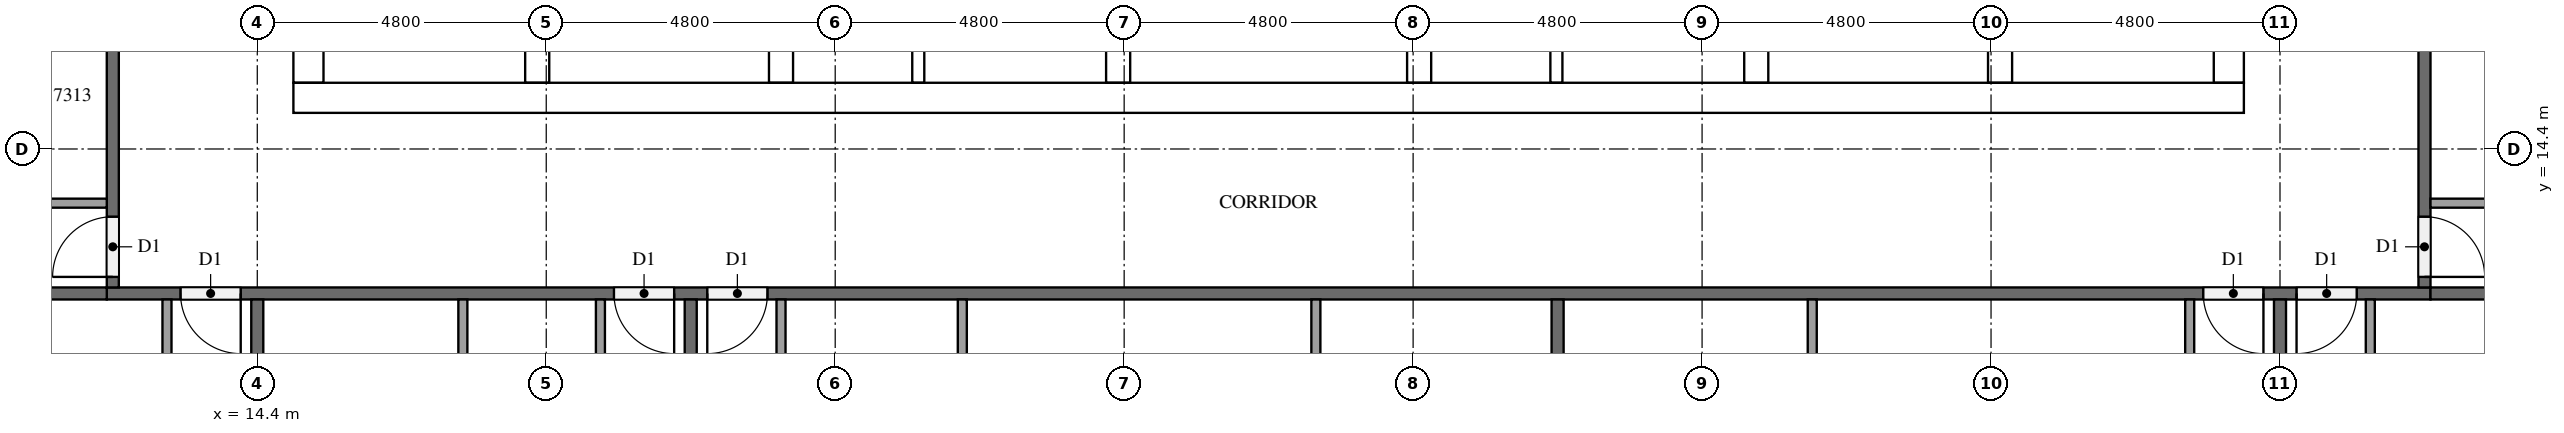
"""IFC4 building model, lengths in metres.
Left out: names, types, materials, properties, quantities, classifications, styles, units other than length and angle.
Written with IfcOpenShell. Run it as: python <this file> out.ifc"""

import sys

from ifc_helpers import new_model, si_unit, direction, frame, frame_2d, origin, place, context, subcontext, project, spatial, rectangle, extrude, element, fill, save


model = new_model("IFC4")
c1 = context("Model", 3, precision=1e-05, world=origin(), true_north=direction((0.0, 1.0)))
c2 = subcontext(c1, "Body", "Model", "MODEL_VIEW")
j1 = project(units=[si_unit("LENGTHUNIT", "METRE"), si_unit("PLANEANGLEUNIT", "RADIAN")], contexts=[c1])
p1 = place(None, origin())
s1 = spatial("IfcSite", under=j1, at=p1, CompositionType="ELEMENT")
p2 = place(p1, origin())
s2 = spatial("IfcBuilding", under=s1, at=p2, CompositionType="ELEMENT")
p3 = place(p2, frame((0.0, 0.0, 279.1)))
s3 = spatial("IfcBuildingStorey", under=s2, at=p3, CompositionType="ELEMENT", Elevation=279.1)
p4 = place(p3, frame((15.0, 15.25, 0.0), z_axis=(0.0, 0.0, 1.0), x_axis=(1.0, 0.0, 0.0)))
e1 = element("IfcWall", 1, at=p4, inside=s3, PredefinedType="SHEAR", context=c2, shape_type="SweptSolid", body=[
    extrude(rectangle(XDim=32.4, YDim=0.5, at=frame_2d((16.2, 0.0))), origin(), (0.0, 0.0, 1.0), 3.2),
])
p5 = place(p4, frame((15.3, 0.0, 0.0)))
e2 = element("IfcOpeningElement", 2, at=p5, cuts=e1, PredefinedType="OPENING", context=c2, shape_type="SweptSolid", body=[
    extrude(rectangle(XDim=1.8, YDim=2.1, at=frame_2d((0.9, 1.05))), frame((0.0, 0.26, 0.0), z_axis=(0.0, -1.0, 0.0), x_axis=(1.0, 0.0, 0.0)), (0.0, 0.0, 1.0), 0.52),
])
p6 = place(p3, frame((15.25, 15.5, 0.0), z_axis=(0.0, 0.0, 1.0), x_axis=(0.0, 1.0, 0.0)))
e3 = element("IfcWall", 3, at=p6, inside=s3, PredefinedType="SHEAR", context=c2, shape_type="SweptSolid", body=[
    extrude(rectangle(XDim=21.8, YDim=0.5, at=frame_2d((10.9, 0.0))), origin(), (0.0, 0.0, 1.0), 3.2),
])
p7 = place(p6, frame((5.26, 0.0, 0.0)))
e4 = element("IfcOpeningElement", 4, at=p7, cuts=e3, PredefinedType="OPENING", context=c2, shape_type="SweptSolid", body=[
    extrude(rectangle(XDim=1.2, YDim=2.1, at=frame_2d((0.6, 1.05))), frame((0.0, 0.26, 0.0), z_axis=(0.0, -1.0, 0.0), x_axis=(1.0, 0.0, 0.0)), (0.0, 0.0, 1.0), 0.52),
])
p8 = place(p3, frame((47.15, 15.5, 0.0), z_axis=(0.0, 0.0, 1.0), x_axis=(0.0, 1.0, 0.0)))
e5 = element("IfcWall", 5, at=p8, inside=s3, PredefinedType="SHEAR", context=c2, shape_type="SweptSolid", body=[
    extrude(rectangle(XDim=21.8, YDim=0.5, at=frame_2d((10.9, 0.0))), origin(), (0.0, 0.0, 1.0), 3.2),
])
p9 = place(p8, frame((10.6, 0.0, 0.0)))
e6 = element("IfcOpeningElement", 6, at=p9, cuts=e5, PredefinedType="OPENING", context=c2, shape_type="SweptSolid", body=[
    extrude(rectangle(XDim=1.2, YDim=2.1, at=frame_2d((0.6, 1.05))), frame((0.0, 0.26, 0.0), z_axis=(0.0, -1.0, 0.0), x_axis=(1.0, 0.0, 0.0)), (0.0, 0.0, 1.0), 0.52),
])
p10 = place(p3, frame((19.05, 15.5, 0.0), z_axis=(0.0, 0.0, 1.0), x_axis=(0.0, 1.0, 0.0)))
e7 = element("IfcWall", 7, at=p10, inside=s3, PredefinedType="SHEAR", context=c2, shape_type="SweptSolid", body=[
    extrude(rectangle(XDim=15.55, YDim=0.4, at=frame_2d((7.775, 0.0))), origin(), (0.0, 0.0, 1.0), 3.2),
])
p11 = place(p10, frame((9.95, 0.0, 0.0)))
e8 = element("IfcOpeningElement", 8, at=p11, cuts=e7, PredefinedType="OPENING", context=c2, shape_type="SweptSolid", body=[
    extrude(rectangle(XDim=1.1, YDim=2.1, at=frame_2d((0.55, 1.05))), frame((0.0, 0.21, 0.0), z_axis=(0.0, -1.0, 0.0), x_axis=(1.0, 0.0, 0.0)), (0.0, 0.0, 1.0), 0.42),
])
p12 = place(p10, frame((13.45, 0.0, 0.0)))
e9 = element("IfcOpeningElement", 9, at=p12, cuts=e7, PredefinedType="OPENING", context=c2, shape_type="SweptSolid", body=[
    extrude(rectangle(XDim=1.1, YDim=2.1, at=frame_2d((0.55, 1.05))), frame((0.0, 0.21, 0.0), z_axis=(0.0, -1.0, 0.0), x_axis=(1.0, 0.0, 0.0)), (0.0, 0.0, 1.0), 0.42),
])
p13 = place(p10, frame((0.7, 0.0, 0.0)))
e10 = element("IfcOpeningElement", 10, at=p13, cuts=e7, PredefinedType="OPENING", context=c2, shape_type="SweptSolid", body=[
    extrude(rectangle(XDim=1.2, YDim=2.1, at=frame_2d((0.6, 1.05))), frame((0.0, 0.21, 0.0), z_axis=(0.0, -1.0, 0.0), x_axis=(1.0, 0.0, 0.0)), (0.0, 0.0, 1.0), 0.42),
])
p14 = place(p3, frame((23.1, 15.5, 0.0), z_axis=(0.0, 0.0, 1.0), x_axis=(0.0, 1.0, 0.0)))
e11 = element("IfcWall", 11, at=p14, inside=s3, PredefinedType="SHEAR", context=c2, shape_type="SweptSolid", body=[
    extrude(rectangle(XDim=21.8, YDim=0.4, at=frame_2d((10.9, 0.0))), origin(), (0.0, 0.0, 1.0), 3.2),
])
p15 = place(p3, frame((39.3, 15.5, 0.0), z_axis=(0.0, 0.0, 1.0), x_axis=(0.0, 1.0, 0.0)))
e12 = element("IfcWall", 12, at=p15, inside=s3, PredefinedType="SHEAR", context=c2, shape_type="SweptSolid", body=[
    extrude(rectangle(XDim=8.75, YDim=0.4, at=frame_2d((4.375, 0.0))), origin(), (0.0, 0.0, 1.0), 3.2),
])
p16 = place(p3, frame((43.35, 15.5, 0.0), z_axis=(0.0, 0.0, 1.0), x_axis=(0.0, 1.0, 0.0)))
e13 = element("IfcWall", 13, at=p16, inside=s3, PredefinedType="SHEAR", context=c2, shape_type="SweptSolid", body=[
    extrude(rectangle(XDim=8.75, YDim=0.4, at=frame_2d((4.375, 0.0))), origin(), (0.0, 0.0, 1.0), 3.2),
])
p17 = place(p16, frame((0.7, 0.0, 0.0)))
e14 = element("IfcOpeningElement", 14, at=p17, cuts=e13, PredefinedType="OPENING", context=c2, shape_type="SweptSolid", body=[
    extrude(rectangle(XDim=1.2, YDim=2.1, at=frame_2d((0.6, 1.05))), frame((0.0, 0.21, 0.0), z_axis=(0.0, -1.0, 0.0), x_axis=(1.0, 0.0, 0.0)), (0.0, 0.0, 1.0), 0.42),
])
for number, where, z_axis, x_axis in (
    (15, (28.7, 15.5, 0.0), (0.0, 0.0, 1.0), (0.0, 1.0, 0.0)),
    (16, (33.7, 15.5, 0.0), (0.0, 0.0, 1.0), (0.0, 1.0, 0.0)),
):
    element("IfcWall", number, at=place(p3, frame(where, z_axis=z_axis, x_axis=x_axis)), inside=s3, PredefinedType="SHEAR", context=c2, shape_type="SweptSolid", body=[
        extrude(rectangle(XDim=3.05, YDim=0.4, at=frame_2d((1.525, 0.0))), origin(), (0.0, 0.0, 1.0), 3.2),
    ])
for number, where, z_axis, x_axis in (
    (17, (25.38, 15.5, 0.0), (0.0, 0.0, 1.0), (0.0, 1.0, 0.0)),
    (18, (35.98, 15.5, 0.0), (0.0, 0.0, 1.0), (0.0, 1.0, 0.0)),
):
    element("IfcWall", number, at=place(p3, frame(where, z_axis=z_axis, x_axis=x_axis)), inside=s3, PredefinedType="PARTITIONING", context=c2, shape_type="SweptSolid", body=[
        extrude(rectangle(XDim=3.05, YDim=0.2, at=frame_2d((1.525, 0.0))), origin(), (0.0, 0.0, 1.0), 3.2),
    ])
p18 = place(p3, frame((50.5, 12.0, 0.0), z_axis=(0.0, 0.0, 1.0), x_axis=(-1.0, 0.0, 0.0)))
e19 = element("IfcWall", 19, at=p18, inside=s3, PredefinedType="PARTITIONING", context=c2, shape_type="SweptSolid", body=[
    extrude(rectangle(XDim=38.6, YDim=0.2, at=frame_2d((19.3, 0.0))), origin(), (0.0, 0.0, 1.0), 3.2),
])
p19 = place(p18, frame((36.375, 0.0, 0.0)))
e20 = element("IfcOpeningElement", 20, at=p19, cuts=e19, PredefinedType="OPENING", context=c2, shape_type="SweptSolid", body=[
    extrude(rectangle(XDim=1.0, YDim=2.1, at=frame_2d((0.5, 1.05))), frame((0.0, 0.11, 0.0), z_axis=(0.0, -1.0, 0.0), x_axis=(1.0, 0.0, 0.0)), (0.0, 0.0, 1.0), 0.22),
])
p20 = place(p18, frame((29.175, 0.0, 0.0)))
e21 = element("IfcOpeningElement", 21, at=p20, cuts=e19, PredefinedType="OPENING", context=c2, shape_type="SweptSolid", body=[
    extrude(rectangle(XDim=1.0, YDim=2.1, at=frame_2d((0.5, 1.05))), frame((0.0, 0.11, 0.0), z_axis=(0.0, -1.0, 0.0), x_axis=(1.0, 0.0, 0.0)), (0.0, 0.0, 1.0), 0.22),
])
p21 = place(p18, frame((27.625, 0.0, 0.0)))
e22 = element("IfcOpeningElement", 22, at=p21, cuts=e19, PredefinedType="OPENING", context=c2, shape_type="SweptSolid", body=[
    extrude(rectangle(XDim=1.0, YDim=2.1, at=frame_2d((0.5, 1.05))), frame((0.0, 0.11, 0.0), z_axis=(0.0, -1.0, 0.0), x_axis=(1.0, 0.0, 0.0)), (0.0, 0.0, 1.0), 0.22),
])
p22 = place(p18, frame((2.775, 0.0, 0.0)))
e23 = element("IfcOpeningElement", 23, at=p22, cuts=e19, PredefinedType="OPENING", context=c2, shape_type="SweptSolid", body=[
    extrude(rectangle(XDim=1.0, YDim=2.1, at=frame_2d((0.5, 1.05))), frame((0.0, 0.11, 0.0), z_axis=(0.0, -1.0, 0.0), x_axis=(1.0, 0.0, 0.0)), (0.0, 0.0, 1.0), 0.22),
])
p23 = place(p18, frame((1.225, 0.0, 0.0)))
e24 = element("IfcOpeningElement", 24, at=p23, cuts=e19, PredefinedType="OPENING", context=c2, shape_type="SweptSolid", body=[
    extrude(rectangle(XDim=1.0, YDim=2.1, at=frame_2d((0.5, 1.05))), frame((0.0, 0.11, 0.0), z_axis=(0.0, -1.0, 0.0), x_axis=(1.0, 0.0, 0.0)), (0.0, 0.0, 1.0), 0.22),
])
p24 = place(p3, frame((50.4, 40.7, 0.0), z_axis=(0.0, 0.0, 1.0), x_axis=(0.0, -1.0, 0.0)))
e25 = element("IfcWall", 25, at=p24, inside=s3, PredefinedType="PARTITIONING", context=c2, shape_type="SweptSolid", body=[
    extrude(rectangle(XDim=28.6, YDim=0.2, at=frame_2d((14.3, 0.0))), origin(), (0.0, 0.0, 1.0), 3.2),
])
p25 = place(p24, frame((27.425, 0.0, 0.0)))
e26 = element("IfcOpeningElement", 26, at=p25, cuts=e25, PredefinedType="OPENING", context=c2, shape_type="SweptSolid", body=[
    extrude(rectangle(XDim=1.0, YDim=2.1, at=frame_2d((0.5, 1.05))), frame((0.0, 0.11, 0.0), z_axis=(0.0, -1.0, 0.0), x_axis=(1.0, 0.0, 0.0)), (0.0, 0.0, 1.0), 0.22),
])
p26 = place(p24, frame((13.025, 0.0, 0.0)))
e27 = element("IfcOpeningElement", 27, at=p26, cuts=e25, PredefinedType="OPENING", context=c2, shape_type="SweptSolid", body=[
    extrude(rectangle(XDim=1.0, YDim=2.1, at=frame_2d((0.5, 1.05))), frame((0.0, 0.11, 0.0), z_axis=(0.0, -1.0, 0.0), x_axis=(1.0, 0.0, 0.0)), (0.0, 0.0, 1.0), 0.22),
])
p27 = place(p3, frame((12.0, 12.1, 0.0), z_axis=(0.0, 0.0, 1.0), x_axis=(0.0, 1.0, 0.0)))
e28 = element("IfcWall", 28, at=p27, inside=s3, PredefinedType="PARTITIONING", context=c2, shape_type="SweptSolid", body=[
    extrude(rectangle(XDim=28.6, YDim=0.2, at=frame_2d((14.3, 0.0))), origin(), (0.0, 0.0, 1.0), 3.2),
])
p28 = place(p27, frame((16.975, 0.0, 0.0)))
e29 = element("IfcOpeningElement", 29, at=p28, cuts=e28, PredefinedType="OPENING", context=c2, shape_type="SweptSolid", body=[
    extrude(rectangle(XDim=1.0, YDim=2.1, at=frame_2d((0.5, 1.05))), frame((0.0, 0.11, 0.0), z_axis=(0.0, -1.0, 0.0), x_axis=(1.0, 0.0, 0.0)), (0.0, 0.0, 1.0), 0.22),
])
p29 = place(p27, frame((0.175, 0.0, 0.0)))
e30 = element("IfcOpeningElement", 30, at=p29, cuts=e28, PredefinedType="OPENING", context=c2, shape_type="SweptSolid", body=[
    extrude(rectangle(XDim=1.0, YDim=2.1, at=frame_2d((0.5, 1.05))), frame((0.0, 0.11, 0.0), z_axis=(0.0, -1.0, 0.0), x_axis=(1.0, 0.0, 0.0)), (0.0, 0.0, 1.0), 0.22),
])
p30 = place(p3, frame((14.4, 11.9, 0.0), z_axis=(0.0, 0.0, 1.0), x_axis=(0.0, -1.0, 0.0)))
e31 = element("IfcWall", 31, at=p30, inside=s3, PredefinedType="PARTITIONING", context=c2, shape_type="SweptSolid", body=[
    extrude(rectangle(XDim=11.65, YDim=0.2, at=frame_2d((5.825, 0.0))), origin(), (0.0, 0.0, 1.0), 3.2),
])
for number, where, z_axis, x_axis in (
    (32, (0.1, 12.0, 0.0), (0.0, 0.0, 1.0), (1.0, 0.0, 0.0)),
    (33, (21.6, 11.9, 0.0), (0.0, 0.0, 1.0), (0.0, -1.0, 0.0)),
    (34, (36.0, 11.9, 0.0), (0.0, 0.0, 1.0), (0.0, -1.0, 0.0)),
    (35, (48.0, 11.9, 0.0), (0.0, 0.0, 1.0), (0.0, -1.0, 0.0)),
):
    element("IfcWall", number, at=place(p3, frame(where, z_axis=z_axis, x_axis=x_axis)), inside=s3, PredefinedType="PARTITIONING", context=c2, shape_type="SweptSolid", body=[
        extrude(rectangle(XDim=11.8, YDim=0.2, at=frame_2d((5.9, 0.0))), origin(), (0.0, 0.0, 1.0), 3.2),
    ])
p31 = place(p3, frame((50.5, 12.0, 0.0), z_axis=(0.0, 0.0, 1.0), x_axis=(1.0, 0.0, 0.0)))
e36 = element("IfcWall", 36, at=p31, inside=s3, PredefinedType="PARTITIONING", context=c2, shape_type="SweptSolid", body=[
    extrude(rectangle(XDim=7.0, YDim=0.2, at=frame_2d((3.5, 0.0))), origin(), (0.0, 0.0, 1.0), 3.2),
])
p32 = place(p3, frame((12.9, 11.9, 0.0), z_axis=(0.0, 0.0, 1.0), x_axis=(0.0, -1.0, 0.0)))
e37 = element("IfcWall", 37, at=p32, inside=s3, PredefinedType="PARTITIONING", context=c2, shape_type="SweptSolid", body=[
    extrude(rectangle(XDim=3.125, YDim=0.15, at=frame_2d((1.562, 0.0))), origin(), (0.0, 0.0, 1.0), 3.2),
])
p33 = place(p3, frame((17.815, 11.9, 0.0), z_axis=(0.0, 0.0, 1.0), x_axis=(0.0, -1.0, 0.0)))
e38 = element("IfcWall", 38, at=p33, inside=s3, PredefinedType="PARTITIONING", context=c2, shape_type="SweptSolid", body=[
    extrude(rectangle(XDim=2.975, YDim=0.15, at=frame_2d((1.487, 0.0))), origin(), (0.0, 0.0, 1.0), 3.2),
])
p34 = place(p3, frame((20.1, 11.9, 0.0), z_axis=(0.0, 0.0, 1.0), x_axis=(0.0, -1.0, 0.0)))
e39 = element("IfcWall", 39, at=p34, inside=s3, PredefinedType="PARTITIONING", context=c2, shape_type="SweptSolid", body=[
    extrude(rectangle(XDim=3.125, YDim=0.15, at=frame_2d((1.562, 0.0))), origin(), (0.0, 0.0, 1.0), 3.2),
])
for number, where, z_axis, x_axis in (
    (40, (26.112, 11.9, 0.0), (0.0, 0.0, 1.0), (0.0, -1.0, 0.0)),
    (41, (31.985, 11.9, 0.0), (0.0, 0.0, 1.0), (0.0, -1.0, 0.0)),
):
    element("IfcWall", number, at=place(p3, frame(where, z_axis=z_axis, x_axis=x_axis)), inside=s3, PredefinedType="PARTITIONING", context=c2, shape_type="SweptSolid", body=[
        extrude(rectangle(XDim=3.725, YDim=0.15, at=frame_2d((1.862, 0.0))), origin(), (0.0, 0.0, 1.0), 3.2),
    ])
for number, where, z_axis, x_axis in (
    (42, (23.1, 11.9, 0.0), (0.0, 0.0, 1.0), (0.0, -1.0, 0.0)),
    (43, (40.23, 11.9, 0.0), (0.0, 0.0, 1.0), (0.0, -1.0, 0.0)),
):
    element("IfcWall", number, at=place(p3, frame(where, z_axis=z_axis, x_axis=x_axis)), inside=s3, PredefinedType="PARTITIONING", context=c2, shape_type="SweptSolid", body=[
        extrude(rectangle(XDim=3.875, YDim=0.15, at=frame_2d((1.938, 0.0))), origin(), (0.0, 0.0, 1.0), 3.2),
    ])
p35 = place(p3, frame((46.5, 11.9, 0.0), z_axis=(0.0, 0.0, 1.0), x_axis=(0.0, -1.0, 0.0)))
e44 = element("IfcWall", 44, at=p35, inside=s3, PredefinedType="PARTITIONING", context=c2, shape_type="SweptSolid", body=[
    extrude(rectangle(XDim=4.025, YDim=0.15, at=frame_2d((2.012, 0.0))), origin(), (0.0, 0.0, 1.0), 3.2),
])
p36 = place(p3, frame((49.5, 11.9, 0.0), z_axis=(0.0, 0.0, 1.0), x_axis=(0.0, -1.0, 0.0)))
e45 = element("IfcWall", 45, at=p36, inside=s3, PredefinedType="PARTITIONING", context=c2, shape_type="SweptSolid", body=[
    extrude(rectangle(XDim=3.725, YDim=0.15, at=frame_2d((1.862, 0.0))), origin(), (0.0, 0.0, 1.0), 3.2),
])
p37 = place(p3, frame((50.5, 13.5, 0.0), z_axis=(0.0, 0.0, 1.0), x_axis=(1.0, 0.0, 0.0)))
e46 = element("IfcWall", 46, at=p37, inside=s3, PredefinedType="PARTITIONING", context=c2, shape_type="SweptSolid", body=[
    extrude(rectangle(XDim=2.375, YDim=0.15, at=frame_2d((1.188, 0.0))), origin(), (0.0, 0.0, 1.0), 3.2),
])
p38 = place(p3, frame((11.9, 13.5, 0.0), z_axis=(0.0, 0.0, 1.0), x_axis=(-1.0, 0.0, 0.0)))
e47 = element("IfcWall", 47, at=p38, inside=s3, PredefinedType="PARTITIONING", context=c2, shape_type="SweptSolid", body=[
    extrude(rectangle(XDim=3.725, YDim=0.15, at=frame_2d((1.862, 0.0))), origin(), (0.0, 0.0, 1.0), 3.2),
])
p39 = place(p5, frame((1.8, 0.0, 0.0), z_axis=(0.0, 0.0, 1.0), x_axis=(-1.0, 0.0, 0.0)))
e48 = element("IfcDoor", 48, at=p39, inside=s3, OperationType="DOUBLE_DOOR_SINGLE_SWING", PredefinedType="DOOR", context=c2, shape_type="SweptSolid", body=[
    extrude(rectangle(XDim=1.8, YDim=2.1, at=frame_2d((0.9, 1.05))), frame((0.0, 0.025, 0.0), z_axis=(0.0, -1.0, 0.0), x_axis=(1.0, 0.0, 0.0)), (0.0, 0.0, 1.0), 0.05),
])
fill(e2, e48)
p40 = place(p19, origin())
e49 = element("IfcDoor", 49, at=p40, inside=s3, OperationType="SINGLE_SWING_LEFT", PredefinedType="DOOR", context=c2, shape_type="SweptSolid", body=[
    extrude(rectangle(XDim=1.0, YDim=2.1, at=frame_2d((0.5, 1.05))), frame((0.0, 0.025, 0.0), z_axis=(0.0, -1.0, 0.0), x_axis=(1.0, 0.0, 0.0)), (0.0, 0.0, 1.0), 0.05),
])
fill(e20, e49)
p41 = place(p20, origin())
e50 = element("IfcDoor", 50, at=p41, inside=s3, OperationType="SINGLE_SWING_LEFT", PredefinedType="DOOR", context=c2, shape_type="SweptSolid", body=[
    extrude(rectangle(XDim=1.0, YDim=2.1, at=frame_2d((0.5, 1.05))), frame((0.0, 0.025, 0.0), z_axis=(0.0, -1.0, 0.0), x_axis=(1.0, 0.0, 0.0)), (0.0, 0.0, 1.0), 0.05),
])
fill(e21, e50)
p42 = place(p21, origin())
e51 = element("IfcDoor", 51, at=p42, inside=s3, OperationType="SINGLE_SWING_RIGHT", PredefinedType="DOOR", context=c2, shape_type="SweptSolid", body=[
    extrude(rectangle(XDim=1.0, YDim=2.1, at=frame_2d((0.5, 1.05))), frame((0.0, 0.025, 0.0), z_axis=(0.0, -1.0, 0.0), x_axis=(1.0, 0.0, 0.0)), (0.0, 0.0, 1.0), 0.05),
])
fill(e22, e51)
p43 = place(p22, origin())
e52 = element("IfcDoor", 52, at=p43, inside=s3, OperationType="SINGLE_SWING_LEFT", PredefinedType="DOOR", context=c2, shape_type="SweptSolid", body=[
    extrude(rectangle(XDim=1.0, YDim=2.1, at=frame_2d((0.5, 1.05))), frame((0.0, 0.025, 0.0), z_axis=(0.0, -1.0, 0.0), x_axis=(1.0, 0.0, 0.0)), (0.0, 0.0, 1.0), 0.05),
])
fill(e23, e52)
p44 = place(p23, origin())
e53 = element("IfcDoor", 53, at=p44, inside=s3, OperationType="SINGLE_SWING_RIGHT", PredefinedType="DOOR", context=c2, shape_type="SweptSolid", body=[
    extrude(rectangle(XDim=1.0, YDim=2.1, at=frame_2d((0.5, 1.05))), frame((0.0, 0.025, 0.0), z_axis=(0.0, -1.0, 0.0), x_axis=(1.0, 0.0, 0.0)), (0.0, 0.0, 1.0), 0.05),
])
fill(e24, e53)
p45 = place(p25, origin())
e54 = element("IfcDoor", 54, at=p45, inside=s3, OperationType="SINGLE_SWING_RIGHT", PredefinedType="DOOR", context=c2, shape_type="SweptSolid", body=[
    extrude(rectangle(XDim=1.0, YDim=2.1, at=frame_2d((0.5, 1.05))), frame((0.0, 0.025, 0.0), z_axis=(0.0, -1.0, 0.0), x_axis=(1.0, 0.0, 0.0)), (0.0, 0.0, 1.0), 0.05),
])
fill(e26, e54)
p46 = place(p29, origin())
e55 = element("IfcDoor", 55, at=p46, inside=s3, OperationType="SINGLE_SWING_LEFT", PredefinedType="DOOR", context=c2, shape_type="SweptSolid", body=[
    extrude(rectangle(XDim=1.0, YDim=2.1, at=frame_2d((0.5, 1.05))), frame((0.0, 0.025, 0.0), z_axis=(0.0, -1.0, 0.0), x_axis=(1.0, 0.0, 0.0)), (0.0, 0.0, 1.0), 0.05),
])
fill(e30, e55)
save(model, sys.argv[1])
